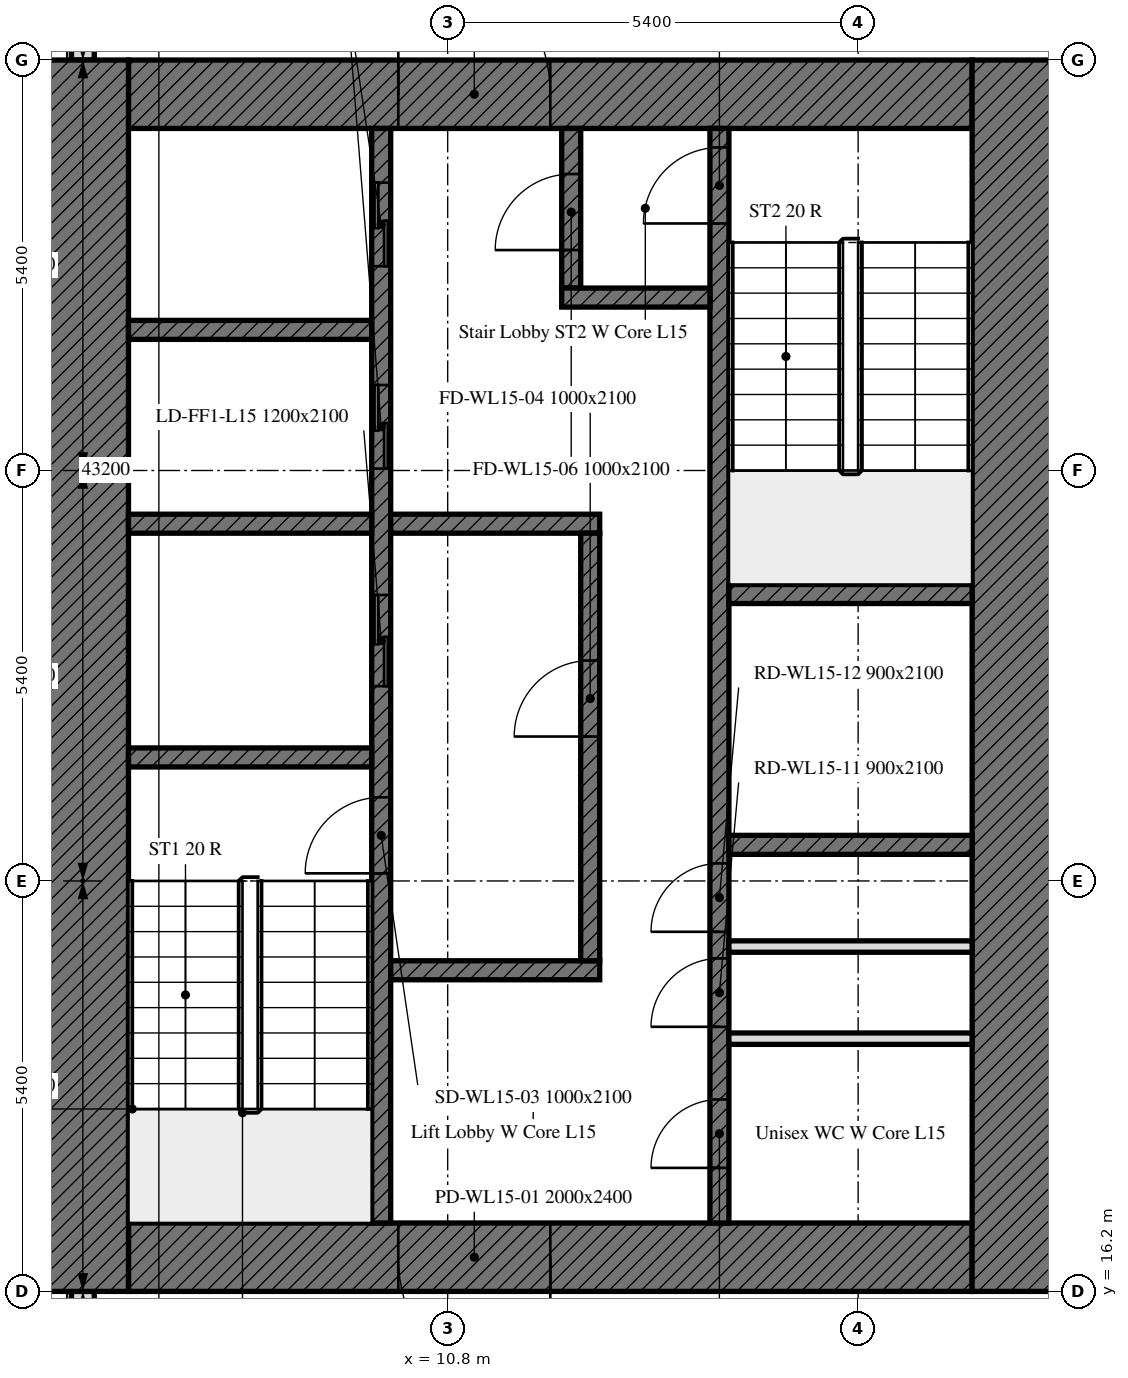
"""IFC4 building model, lengths in metres.
Left out: names, types, materials, properties, quantities, classifications, styles, units other than length and angle.
Written with IfcOpenShell. Run it as: python <this file> out.ifc"""

import sys

from ifc_helpers import new_model, si_unit, direction, frame, frame_2d, origin, place, context, subcontext, project, spatial, rectangle, extrude, element, fill, save


model = new_model("IFC4")
c1 = context("Model", 3, precision=1e-05, world=origin(), true_north=direction((0.0, 1.0)))
c2 = subcontext(c1, "Body", "Model", "MODEL_VIEW")
j1 = project(units=[si_unit("LENGTHUNIT", "METRE"), si_unit("PLANEANGLEUNIT", "RADIAN")], contexts=[c1])
p1 = place(None, origin())
s1 = spatial("IfcSite", under=j1, at=p1, CompositionType="ELEMENT")
p2 = place(p1, origin())
s2 = spatial("IfcBuilding", under=s1, at=p2, CompositionType="ELEMENT")
p3 = place(p2, frame((0.0, 0.0, 68.8)))
s3 = spatial("IfcBuildingStorey", under=s2, at=p3, CompositionType="ELEMENT", Elevation=68.8)
p4 = place(p3, frame((6.0, 43.014, 0.0), z_axis=(0.0, 0.0, 1.0), x_axis=(0.0, -1.0, 0.0)))
e1 = element("IfcWall", 1, at=p4, inside=s3, PredefinedType="SOLIDWALL", context=c2, shape_type="SweptSolid", body=[
    extrude(rectangle(XDim=10.614, YDim=0.3, at=frame_2d((5.307, 0.0))), origin(), (0.0, 0.0, 1.0), 3.5),
])
p5 = place(p4, frame((6.564, 0.0, 0.9)))
e2 = element("IfcOpeningElement", 2, at=p5, cuts=e1, PredefinedType="OPENING", context=c2, shape_type="SweptSolid", body=[
    extrude(rectangle(XDim=1.1, YDim=1.7, at=frame_2d((0.55, 0.85))), frame((0.0, 0.16, 0.0), z_axis=(0.0, -1.0, 0.0), x_axis=(1.0, 0.0, 0.0)), (0.0, 0.0, 1.0), 0.32),
])
p6 = place(p4, frame((8.164, 0.0, 0.9)))
e3 = element("IfcOpeningElement", 3, at=p6, cuts=e1, PredefinedType="OPENING", context=c2, shape_type="SweptSolid", body=[
    extrude(rectangle(XDim=1.1, YDim=1.7, at=frame_2d((0.55, 0.85))), frame((0.0, 0.16, 0.0), z_axis=(0.0, -1.0, 0.0), x_axis=(1.0, 0.0, 0.0)), (0.0, 0.0, 1.0), 0.32),
])
p7 = place(p3, frame((6.0, 16.2, 0.0), z_axis=(0.0, 0.0, 1.0), x_axis=(0.0, -1.0, 0.0)))
e4 = element("IfcWall", 4, at=p7, inside=s3, PredefinedType="SOLIDWALL", context=c2, shape_type="SweptSolid", body=[
    extrude(rectangle(XDim=5.214, YDim=0.3, at=frame_2d((2.607, 0.0))), origin(), (0.0, 0.0, 1.0), 3.5),
])
p8 = place(p7, frame((1.35, 0.0, 0.9)))
e5 = element("IfcOpeningElement", 5, at=p8, cuts=e4, PredefinedType="OPENING", context=c2, shape_type="SweptSolid", body=[
    extrude(rectangle(XDim=1.1, YDim=1.7, at=frame_2d((0.55, 0.85))), frame((0.0, 0.16, 0.0), z_axis=(0.0, -1.0, 0.0), x_axis=(1.0, 0.0, 0.0)), (0.0, 0.0, 1.0), 0.32),
])
p9 = place(p7, frame((2.95, 0.0, 0.9)))
e6 = element("IfcOpeningElement", 6, at=p9, cuts=e4, PredefinedType="OPENING", context=c2, shape_type="SweptSolid", body=[
    extrude(rectangle(XDim=1.1, YDim=1.7, at=frame_2d((0.55, 0.85))), frame((0.0, 0.16, 0.0), z_axis=(0.0, -1.0, 0.0), x_axis=(1.0, 0.0, 0.0)), (0.0, 0.0, 1.0), 0.32),
])
p10 = place(p3, frame((17.7, 16.65, 0.0), z_axis=(0.0, 0.0, 1.0), x_axis=(-1.0, 0.0, 0.0)))
e7 = element("IfcWall", 7, at=p10, inside=s3, PredefinedType="SOLIDWALL", context=c2, shape_type="SweptSolid", body=[
    extrude(rectangle(XDim=11.1, YDim=0.9, at=frame_2d((5.55, 0.0))), origin(), (0.0, 0.0, 1.0), 3.5),
])
p11 = place(p10, frame((5.55, 0.0, 0.0)))
e8 = element("IfcOpeningElement", 8, at=p11, cuts=e7, PredefinedType="OPENING", context=c2, shape_type="SweptSolid", body=[
    extrude(rectangle(XDim=2.0, YDim=2.4, at=frame_2d((1.0, 1.2))), frame((0.0, 0.45, 0.0), z_axis=(0.0, -1.0, 0.0), x_axis=(1.0, 0.0, 0.0)), (0.0, 0.0, 1.0), 0.9),
])
p12 = place(p3, frame((6.6, 31.95, 0.0), z_axis=(0.0, 0.0, 1.0), x_axis=(1.0, 0.0, 0.0)))
e9 = element("IfcWall", 9, at=p12, inside=s3, PredefinedType="SOLIDWALL", context=c2, shape_type="SweptSolid", body=[
    extrude(rectangle(XDim=11.1, YDim=0.9, at=frame_2d((5.55, 0.0))), origin(), (0.0, 0.0, 1.0), 3.5),
])
p13 = place(p12, frame((3.55, 0.0, 0.0)))
e10 = element("IfcOpeningElement", 10, at=p13, cuts=e9, PredefinedType="OPENING", context=c2, shape_type="SweptSolid", body=[
    extrude(rectangle(XDim=2.0, YDim=2.4, at=frame_2d((1.0, 1.2))), frame((0.0, 0.45, 0.0), z_axis=(0.0, -1.0, 0.0), x_axis=(1.0, 0.0, 0.0)), (0.0, 0.0, 1.0), 0.9),
])
for number, where, z_axis, x_axis in (
    (11, (6.0, 16.2, 0.0), (0.0, 0.0, 1.0), (0.0, 1.0, 0.0)),
    (12, (18.3, 32.4, 0.0), (0.0, 0.0, 1.0), (0.0, -1.0, 0.0)),
):
    element("IfcWall", number, at=place(p3, frame(where, z_axis=z_axis, x_axis=x_axis)), inside=s3, PredefinedType="SOLIDWALL", context=c2, shape_type="SweptSolid", body=[
        extrude(rectangle(XDim=16.2, YDim=1.2, at=frame_2d((8.1, 0.0))), origin(), (0.0, 0.0, 1.0), 3.5),
    ])
p14 = place(p3, frame((9.925, 17.1, 0.0), z_axis=(0.0, 0.0, 1.0), x_axis=(0.0, 1.0, 0.0)))
e13 = element("IfcWall", 13, at=p14, inside=s3, PredefinedType="SOLIDWALL", context=c2, shape_type="SweptSolid", body=[
    extrude(rectangle(XDim=14.4, YDim=0.25, at=frame_2d((7.2, 0.0))), origin(), (0.0, 0.0, 1.0), 3.5),
])
p15 = place(p14, frame((4.6, 0.0, 0.0)))
e14 = element("IfcOpeningElement", 14, at=p15, cuts=e13, PredefinedType="OPENING", context=c2, shape_type="SweptSolid", body=[
    extrude(rectangle(XDim=1.0, YDim=2.1, at=frame_2d((0.5, 1.05))), frame((0.0, 0.125, 0.0), z_axis=(0.0, -1.0, 0.0), x_axis=(1.0, 0.0, 0.0)), (0.0, 0.0, 1.0), 0.25),
])
p16 = place(p14, frame((7.062, 0.0, 0.0)))
e15 = element("IfcOpeningElement", 15, at=p16, cuts=e13, PredefinedType="OPENING", context=c2, shape_type="SweptSolid", body=[
    extrude(rectangle(XDim=1.2, YDim=2.1, at=frame_2d((0.6, 1.05))), frame((0.0, 0.125, 0.0), z_axis=(0.0, -1.0, 0.0), x_axis=(1.0, 0.0, 0.0)), (0.0, 0.0, 1.0), 0.25),
])
p17 = place(p14, frame((9.925, 0.0, 0.0)))
e16 = element("IfcOpeningElement", 16, at=p17, cuts=e13, PredefinedType="OPENING", context=c2, shape_type="SweptSolid", body=[
    extrude(rectangle(XDim=1.1, YDim=2.1, at=frame_2d((0.55, 1.05))), frame((0.0, 0.125, 0.0), z_axis=(0.0, -1.0, 0.0), x_axis=(1.0, 0.0, 0.0)), (0.0, 0.0, 1.0), 0.25),
])
p18 = place(p14, frame((12.587, 0.0, 0.0)))
e17 = element("IfcOpeningElement", 17, at=p18, cuts=e13, PredefinedType="OPENING", context=c2, shape_type="SweptSolid", body=[
    extrude(rectangle(XDim=1.1, YDim=2.1, at=frame_2d((0.55, 1.05))), frame((0.0, 0.125, 0.0), z_axis=(0.0, -1.0, 0.0), x_axis=(1.0, 0.0, 0.0)), (0.0, 0.0, 1.0), 0.25),
])
p19 = place(p3, frame((14.375, 17.1, 0.0), z_axis=(0.0, 0.0, 1.0), x_axis=(0.0, 1.0, 0.0)))
e18 = element("IfcWall", 18, at=p19, inside=s3, PredefinedType="SOLIDWALL", context=c2, shape_type="SweptSolid", body=[
    extrude(rectangle(XDim=14.4, YDim=0.25, at=frame_2d((7.2, 0.0))), origin(), (0.0, 0.0, 1.0), 3.5),
])
p20 = place(p19, frame((13.15, 0.0, 0.0)))
e19 = element("IfcOpeningElement", 19, at=p20, cuts=e18, PredefinedType="OPENING", context=c2, shape_type="SweptSolid", body=[
    extrude(rectangle(XDim=1.0, YDim=2.1, at=frame_2d((0.5, 1.05))), frame((0.0, 0.125, 0.0), z_axis=(0.0, -1.0, 0.0), x_axis=(1.0, 0.0, 0.0)), (0.0, 0.0, 1.0), 0.25),
])
p21 = place(p19, frame((0.725, 0.0, 0.0)))
e20 = element("IfcOpeningElement", 20, at=p21, cuts=e18, PredefinedType="OPENING", context=c2, shape_type="SweptSolid", body=[
    extrude(rectangle(XDim=0.9, YDim=2.1, at=frame_2d((0.45, 1.05))), frame((0.0, 0.125, 0.0), z_axis=(0.0, -1.0, 0.0), x_axis=(1.0, 0.0, 0.0)), (0.0, 0.0, 1.0), 0.25),
])
p22 = place(p19, frame((2.581, 0.0, 0.0)))
e21 = element("IfcOpeningElement", 21, at=p22, cuts=e18, PredefinedType="OPENING", context=c2, shape_type="SweptSolid", body=[
    extrude(rectangle(XDim=0.9, YDim=2.1, at=frame_2d((0.45, 1.05))), frame((0.0, 0.125, 0.0), z_axis=(0.0, -1.0, 0.0), x_axis=(1.0, 0.0, 0.0)), (0.0, 0.0, 1.0), 0.25),
])
p23 = place(p19, frame((3.831, 0.0, 0.0)))
e22 = element("IfcOpeningElement", 22, at=p23, cuts=e18, PredefinedType="OPENING", context=c2, shape_type="SweptSolid", body=[
    extrude(rectangle(XDim=0.9, YDim=2.1, at=frame_2d((0.45, 1.05))), frame((0.0, 0.125, 0.0), z_axis=(0.0, -1.0, 0.0), x_axis=(1.0, 0.0, 0.0)), (0.0, 0.0, 1.0), 0.25),
])
for number, where, z_axis, x_axis in (
    (23, (6.6, 23.225, 0.0), (0.0, 0.0, 1.0), (1.0, 0.0, 0.0)),
    (24, (14.5, 25.375, 0.0), (0.0, 0.0, 1.0), (1.0, 0.0, 0.0)),
    (25, (14.5, 22.075, 0.0), (0.0, 0.0, 1.0), (1.0, 0.0, 0.0)),
    (26, (6.6, 26.3, 0.0), (0.0, 0.0, 1.0), (1.0, 0.0, 0.0)),
):
    element("IfcWall", number, at=place(p3, frame(where, z_axis=z_axis, x_axis=x_axis)), inside=s3, PredefinedType="SOLIDWALL", context=c2, shape_type="SweptSolid", body=[
        extrude(rectangle(XDim=3.2, YDim=0.25, at=frame_2d((1.6, 0.0))), origin(), (0.0, 0.0, 1.0), 3.5),
    ])
for number, where, z_axis, x_axis in (
    (27, (10.05, 26.3, 0.0), (0.0, 0.0, 1.0), (1.0, 0.0, 0.0)),
    (28, (10.05, 20.425, 0.0), (0.0, 0.0, 1.0), (1.0, 0.0, 0.0)),
):
    element("IfcWall", number, at=place(p3, frame(where, z_axis=z_axis, x_axis=x_axis)), inside=s3, PredefinedType="SOLIDWALL", context=c2, shape_type="SweptSolid", body=[
        extrude(rectangle(XDim=2.75, YDim=0.25, at=frame_2d((1.375, 0.0))), origin(), (0.0, 0.0, 1.0), 3.5),
    ])
p24 = place(p3, frame((12.425, 29.4, 0.0), z_axis=(0.0, 0.0, 1.0), x_axis=(0.0, 1.0, 0.0)))
e29 = element("IfcWall", 29, at=p24, inside=s3, PredefinedType="SOLIDWALL", context=c2, shape_type="SweptSolid", body=[
    extrude(rectangle(XDim=2.1, YDim=0.25, at=frame_2d((1.05, 0.0))), origin(), (0.0, 0.0, 1.0), 3.5),
])
p25 = place(p24, frame((0.5, 0.0, 0.0)))
e30 = element("IfcOpeningElement", 30, at=p25, cuts=e29, PredefinedType="OPENING", context=c2, shape_type="SweptSolid", body=[
    extrude(rectangle(XDim=1.0, YDim=2.1, at=frame_2d((0.5, 1.05))), frame((0.0, 0.125, 0.0), z_axis=(0.0, -1.0, 0.0), x_axis=(1.0, 0.0, 0.0)), (0.0, 0.0, 1.0), 0.25),
])
p26 = place(p3, frame((12.3, 29.275, 0.0), z_axis=(0.0, 0.0, 1.0), x_axis=(1.0, 0.0, 0.0)))
e31 = element("IfcWall", 31, at=p26, inside=s3, PredefinedType="SOLIDWALL", context=c2, shape_type="SweptSolid", body=[
    extrude(rectangle(XDim=1.95, YDim=0.25, at=frame_2d((0.975, 0.0))), origin(), (0.0, 0.0, 1.0), 3.5),
])
p27 = place(p3, frame((12.675, 20.55, 0.0), z_axis=(0.0, 0.0, 1.0), x_axis=(0.0, 1.0, 0.0)))
e32 = element("IfcWall", 32, at=p27, inside=s3, PredefinedType="SOLIDWALL", context=c2, shape_type="SweptSolid", body=[
    extrude(rectangle(XDim=5.625, YDim=0.25, at=frame_2d((2.812, 0.0))), origin(), (0.0, 0.0, 1.0), 3.5),
])
p28 = place(p27, frame((2.95, 0.0, 0.0)))
e33 = element("IfcOpeningElement", 33, at=p28, cuts=e32, PredefinedType="OPENING", context=c2, shape_type="SweptSolid", body=[
    extrude(rectangle(XDim=1.0, YDim=2.1, at=frame_2d((0.5, 1.05))), frame((0.0, 0.125, 0.0), z_axis=(0.0, -1.0, 0.0), x_axis=(1.0, 0.0, 0.0)), (0.0, 0.0, 1.0), 0.25),
])
p29 = place(p3, frame((6.6, 28.85, 0.0), z_axis=(0.0, 0.0, 1.0), x_axis=(1.0, 0.0, 0.0)))
e34 = element("IfcWall", 34, at=p29, inside=s3, PredefinedType="SOLIDWALL", context=c2, shape_type="SweptSolid", body=[
    extrude(rectangle(XDim=3.2, YDim=0.25, at=frame_2d((1.6, 0.0))), origin(), (0.0, 0.0, 1.0), 3.5),
])
for number, where, z_axis, x_axis in (
    (35, (14.5, 19.525, 0.0), (0.0, 0.0, 1.0), (1.0, 0.0, 0.0)),
    (36, (14.5, 20.737, 0.0), (0.0, 0.0, 1.0), (1.0, 0.0, 0.0)),
):
    element("IfcWall", number, at=place(p3, frame(where, z_axis=z_axis, x_axis=x_axis)), inside=s3, PredefinedType="PARTITIONING", context=c2, shape_type="SweptSolid", body=[
        extrude(rectangle(XDim=3.2, YDim=0.15, at=frame_2d((1.6, 0.0))), origin(), (0.0, 0.0, 1.0), 3.5),
    ])
p30 = place(p11, origin())
e37 = element("IfcDoor", 37, at=p30, inside=s3, OperationType="DOUBLE_DOOR_SINGLE_SWING", PredefinedType="DOOR", context=c2, shape_type="SweptSolid", body=[
    extrude(rectangle(XDim=2.0, YDim=2.4, at=frame_2d((1.0, 1.2))), frame((0.0, 0.025, 0.0), z_axis=(0.0, -1.0, 0.0), x_axis=(1.0, 0.0, 0.0)), (0.0, 0.0, 1.0), 0.05),
])
fill(e8, e37)
p31 = place(p13, origin())
e38 = element("IfcDoor", 38, at=p31, inside=s3, OperationType="DOUBLE_DOOR_SINGLE_SWING", PredefinedType="DOOR", context=c2, shape_type="SweptSolid", body=[
    extrude(rectangle(XDim=2.0, YDim=2.4, at=frame_2d((1.0, 1.2))), frame((0.0, 0.025, 0.0), z_axis=(0.0, -1.0, 0.0), x_axis=(1.0, 0.0, 0.0)), (0.0, 0.0, 1.0), 0.05),
])
fill(e10, e38)
p32 = place(p15, origin())
e39 = element("IfcDoor", 39, at=p32, inside=s3, OperationType="SINGLE_SWING_LEFT", PredefinedType="DOOR", context=c2, shape_type="SweptSolid", body=[
    extrude(rectangle(XDim=1.0, YDim=2.1, at=frame_2d((0.5, 1.05))), frame((0.0, 0.025, 0.0), z_axis=(0.0, -1.0, 0.0), x_axis=(1.0, 0.0, 0.0)), (0.0, 0.0, 1.0), 0.05),
])
fill(e14, e39)
p33 = place(p28, origin())
e40 = element("IfcDoor", 40, at=p33, inside=s3, OperationType="SINGLE_SWING_LEFT", PredefinedType="DOOR", context=c2, shape_type="SweptSolid", body=[
    extrude(rectangle(XDim=1.0, YDim=2.1, at=frame_2d((0.5, 1.05))), frame((0.0, 0.025, 0.0), z_axis=(0.0, -1.0, 0.0), x_axis=(1.0, 0.0, 0.0)), (0.0, 0.0, 1.0), 0.05),
])
fill(e33, e40)
p34 = place(p20, origin())
e41 = element("IfcDoor", 41, at=p34, inside=s3, OperationType="SINGLE_SWING_LEFT", PredefinedType="DOOR", context=c2, shape_type="SweptSolid", body=[
    extrude(rectangle(XDim=1.0, YDim=2.1, at=frame_2d((0.5, 1.05))), frame((0.0, 0.025, 0.0), z_axis=(0.0, -1.0, 0.0), x_axis=(1.0, 0.0, 0.0)), (0.0, 0.0, 1.0), 0.05),
])
fill(e19, e41)
p35 = place(p25, origin())
e42 = element("IfcDoor", 42, at=p35, inside=s3, OperationType="SINGLE_SWING_LEFT", PredefinedType="DOOR", context=c2, shape_type="SweptSolid", body=[
    extrude(rectangle(XDim=1.0, YDim=2.1, at=frame_2d((0.5, 1.05))), frame((0.0, 0.025, 0.0), z_axis=(0.0, -1.0, 0.0), x_axis=(1.0, 0.0, 0.0)), (0.0, 0.0, 1.0), 0.05),
])
fill(e30, e42)
p36 = place(p16, origin())
e43 = element("IfcDoor", 43, at=p36, inside=s3, OperationType="DOUBLE_DOOR_SLIDING", PredefinedType="DOOR", context=c2, shape_type="SweptSolid", body=[
    extrude(rectangle(XDim=1.2, YDim=2.1, at=frame_2d((0.6, 1.05))), frame((0.0, 0.025, 0.0), z_axis=(0.0, -1.0, 0.0), x_axis=(1.0, 0.0, 0.0)), (0.0, 0.0, 1.0), 0.05),
])
fill(e15, e43)
p37 = place(p17, origin())
e44 = element("IfcDoor", 44, at=p37, inside=s3, OperationType="DOUBLE_DOOR_SLIDING", PredefinedType="DOOR", context=c2, shape_type="SweptSolid", body=[
    extrude(rectangle(XDim=1.1, YDim=2.1, at=frame_2d((0.55, 1.05))), frame((0.0, 0.025, 0.0), z_axis=(0.0, -1.0, 0.0), x_axis=(1.0, 0.0, 0.0)), (0.0, 0.0, 1.0), 0.05),
])
fill(e16, e44)
p38 = place(p18, origin())
e45 = element("IfcDoor", 45, at=p38, inside=s3, OperationType="DOUBLE_DOOR_SLIDING", PredefinedType="DOOR", context=c2, shape_type="SweptSolid", body=[
    extrude(rectangle(XDim=1.1, YDim=2.1, at=frame_2d((0.55, 1.05))), frame((0.0, 0.025, 0.0), z_axis=(0.0, -1.0, 0.0), x_axis=(1.0, 0.0, 0.0)), (0.0, 0.0, 1.0), 0.05),
])
fill(e17, e45)
p39 = place(p21, origin())
e46 = element("IfcDoor", 46, at=p39, inside=s3, OperationType="SINGLE_SWING_LEFT", PredefinedType="DOOR", context=c2, shape_type="SweptSolid", body=[
    extrude(rectangle(XDim=0.9, YDim=2.1, at=frame_2d((0.45, 1.05))), frame((0.0, 0.025, 0.0), z_axis=(0.0, -1.0, 0.0), x_axis=(1.0, 0.0, 0.0)), (0.0, 0.0, 1.0), 0.05),
])
fill(e20, e46)
p40 = place(p22, origin())
e47 = element("IfcDoor", 47, at=p40, inside=s3, OperationType="SINGLE_SWING_LEFT", PredefinedType="DOOR", context=c2, shape_type="SweptSolid", body=[
    extrude(rectangle(XDim=0.9, YDim=2.1, at=frame_2d((0.45, 1.05))), frame((0.0, 0.025, 0.0), z_axis=(0.0, -1.0, 0.0), x_axis=(1.0, 0.0, 0.0)), (0.0, 0.0, 1.0), 0.05),
])
fill(e21, e47)
p41 = place(p23, origin())
e48 = element("IfcDoor", 48, at=p41, inside=s3, OperationType="SINGLE_SWING_LEFT", PredefinedType="DOOR", context=c2, shape_type="SweptSolid", body=[
    extrude(rectangle(XDim=0.9, YDim=2.1, at=frame_2d((0.45, 1.05))), frame((0.0, 0.025, 0.0), z_axis=(0.0, -1.0, 0.0), x_axis=(1.0, 0.0, 0.0)), (0.0, 0.0, 1.0), 0.05),
])
fill(e22, e48)
save(model, sys.argv[1])
